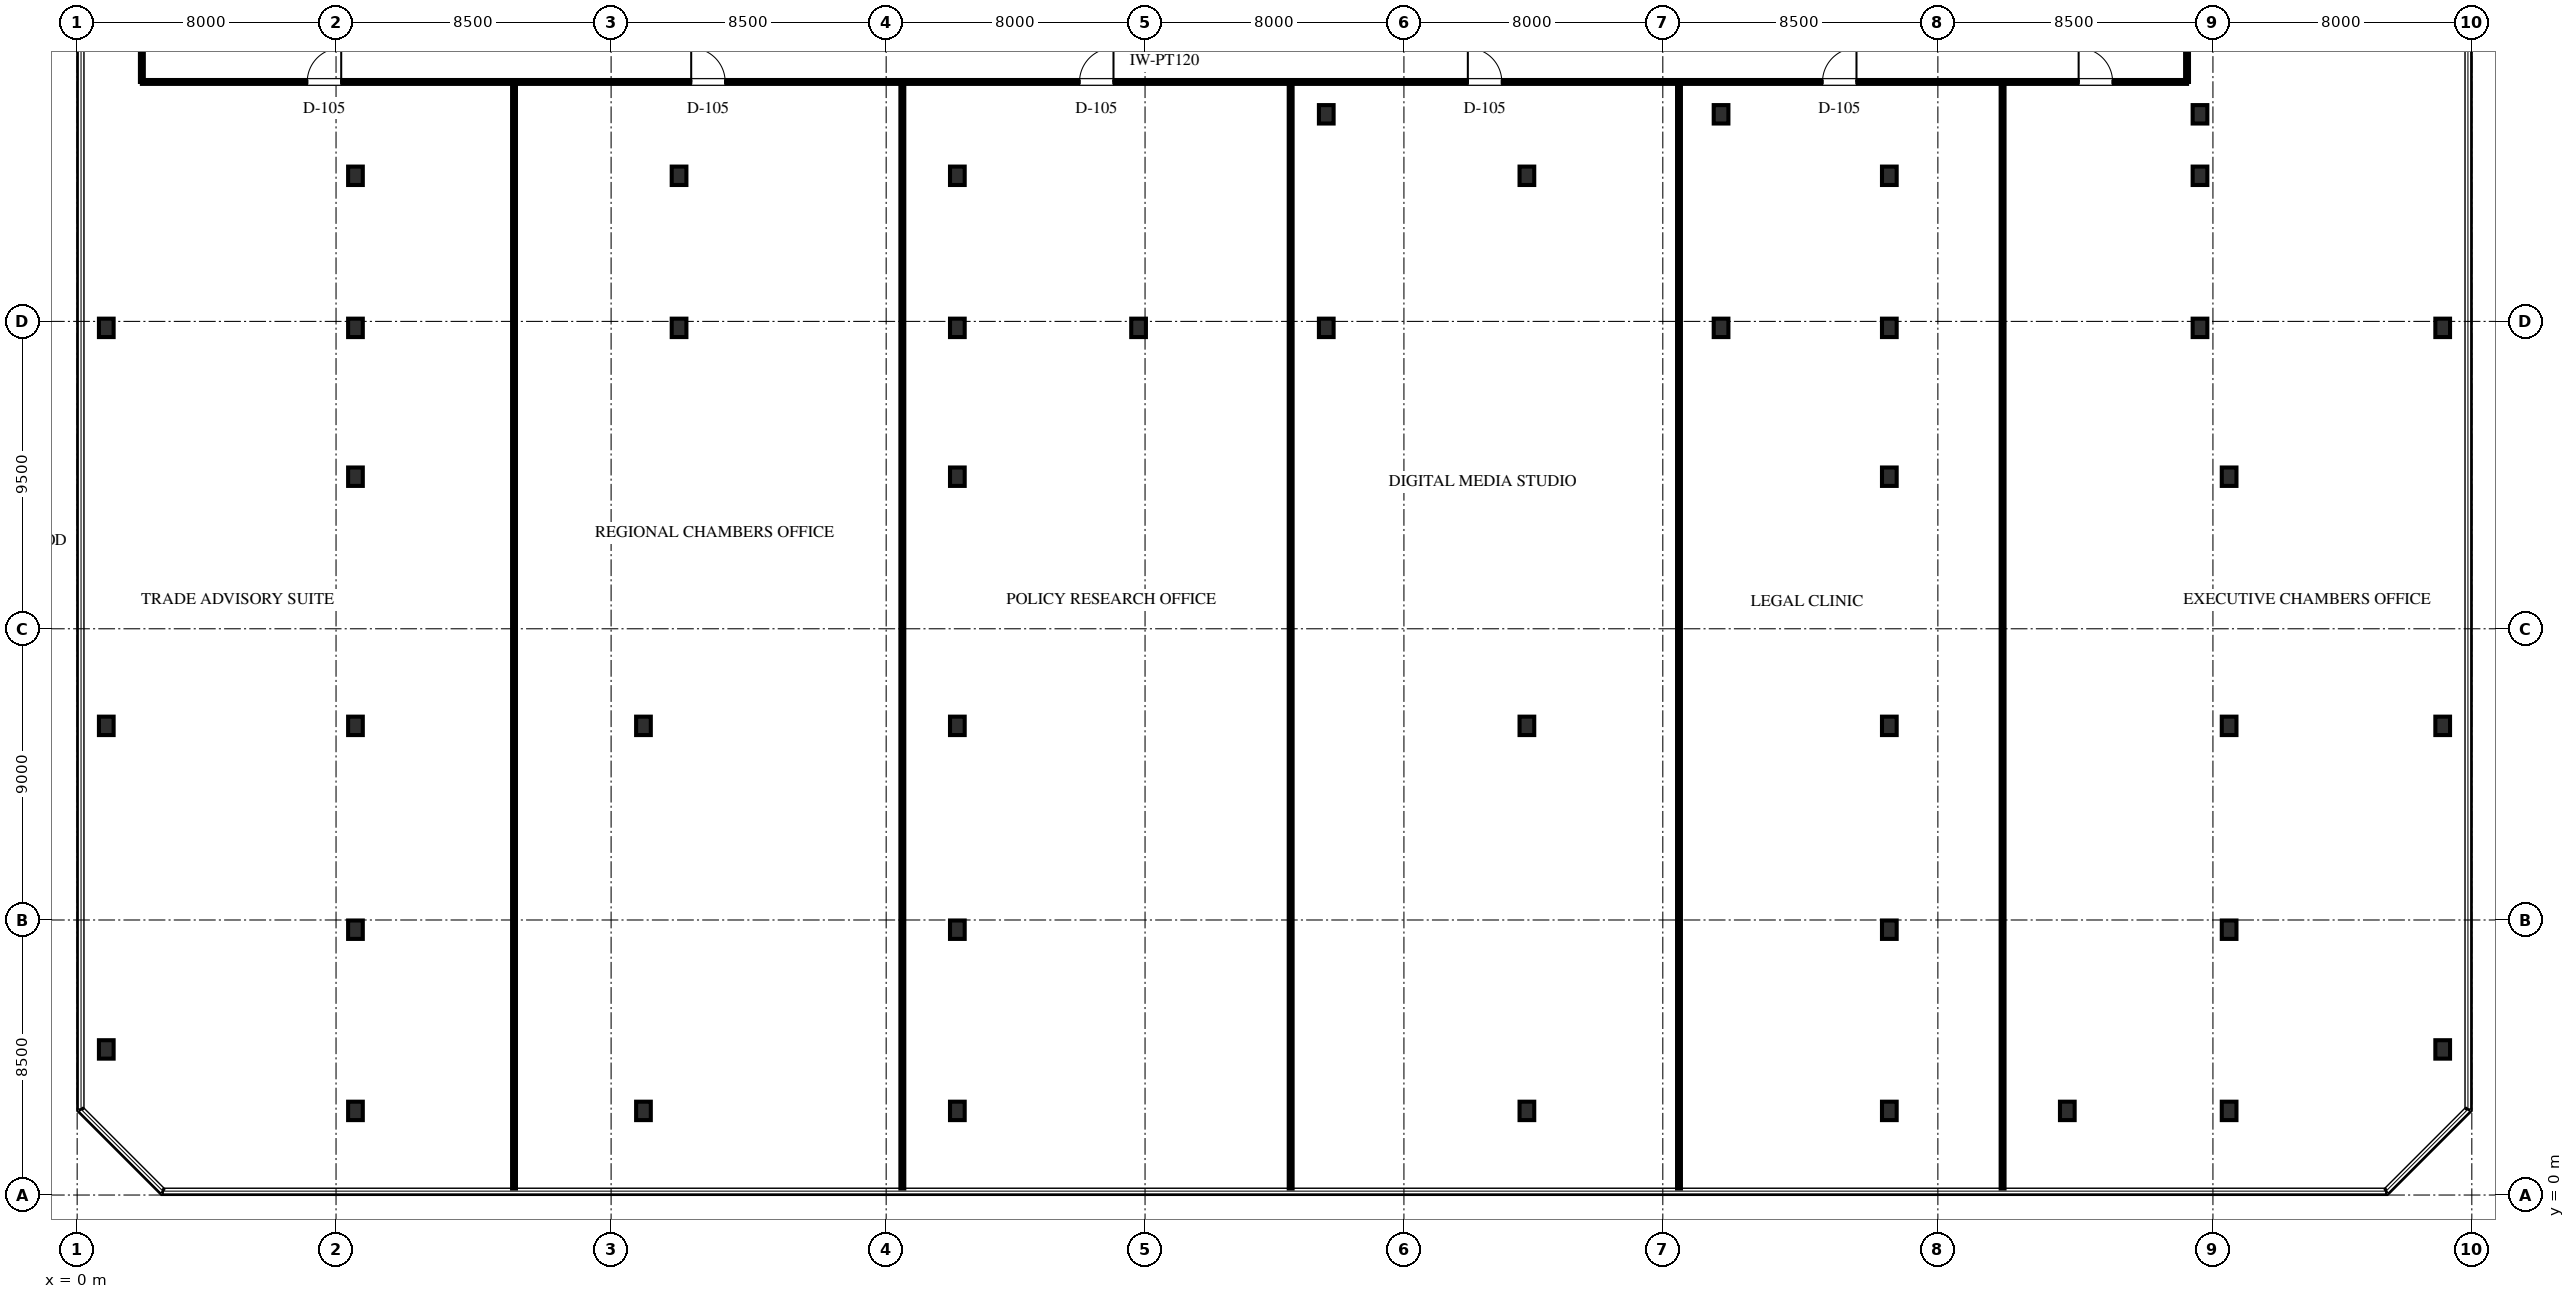
"""IFC4 building model, lengths in metres.
Left out: names, types, materials, properties, quantities, classifications, styles, units other than length and angle.
Written with IfcOpenShell. Run it as: python <this file> out.ifc"""

import sys

from ifc_helpers import new_model, si_unit, direction, frame, frame_2d, origin, origin_2d, place, context, subcontext, project, spatial, rectangle, i_section, extrude, element, fill, save


model = new_model("IFC4")
c1 = context("Model", 3, precision=1e-05, world=origin(), true_north=direction((0.0, 1.0)))
c2 = subcontext(c1, "Body", "Model", "MODEL_VIEW")
j1 = project(units=[si_unit("LENGTHUNIT", "METRE"), si_unit("PLANEANGLEUNIT", "RADIAN")], contexts=[c1])
p1 = place(None, origin())
s1 = spatial("IfcSite", under=j1, at=p1, CompositionType="ELEMENT")
p2 = place(p1, origin())
s2 = spatial("IfcBuilding", under=s1, at=p2, CompositionType="ELEMENT")
p3 = place(p2, frame((0.0, 0.0, 19.8)))
s3 = spatial("IfcBuildingStorey", under=s2, at=p3, CompositionType="ELEMENT", Elevation=19.8)
for number, where, z_axis, x_axis in (
    (1, (8.6, 2.6, 0.0), (0.0, 0.0, 1.0), (1.0, 0.0, 0.0)),
    (2, (17.5, 2.6, 0.0), (0.0, 0.0, 1.0), (1.0, 0.0, 0.0)),
    (3, (27.2, 2.6, 0.0), (0.0, 0.0, 1.0), (1.0, 0.0, 0.0)),
    (4, (44.8, 2.6, 0.0), (0.0, 0.0, 1.0), (1.0, 0.0, 0.0)),
    (5, (56.0, 2.6, 0.0), (0.0, 0.0, 1.0), (1.0, 0.0, 0.0)),
    (6, (61.5, 2.6, 0.0), (0.0, 0.0, 1.0), (1.0, 0.0, 0.0)),
    (7, (66.5, 2.6, 0.0), (0.0, 0.0, 1.0), (1.0, 0.0, 0.0)),
    (8, (8.6, 8.2, 0.0), (0.0, 0.0, 1.0), (1.0, 0.0, 0.0)),
    (9, (27.2, 8.2, 0.0), (0.0, 0.0, 1.0), (1.0, 0.0, 0.0)),
    (10, (56.0, 8.2, 0.0), (0.0, 0.0, 1.0), (1.0, 0.0, 0.0)),
    (11, (66.5, 8.2, 0.0), (0.0, 0.0, 1.0), (1.0, 0.0, 0.0)),
    (12, (8.6, 14.5, 0.0), (0.0, 0.0, 1.0), (1.0, 0.0, 0.0)),
    (13, (17.5, 14.5, 0.0), (0.0, 0.0, 1.0), (1.0, 0.0, 0.0)),
    (14, (27.2, 14.5, 0.0), (0.0, 0.0, 1.0), (1.0, 0.0, 0.0)),
    (15, (44.8, 14.5, 0.0), (0.0, 0.0, 1.0), (1.0, 0.0, 0.0)),
    (16, (56.0, 14.5, 0.0), (0.0, 0.0, 1.0), (1.0, 0.0, 0.0)),
    (17, (66.5, 14.5, 0.0), (0.0, 0.0, 1.0), (1.0, 0.0, 0.0)),
    (18, (8.6, 22.2, 0.0), (0.0, 0.0, 1.0), (1.0, 0.0, 0.0)),
    (19, (27.2, 22.2, 0.0), (0.0, 0.0, 1.0), (1.0, 0.0, 0.0)),
    (20, (56.0, 22.2, 0.0), (0.0, 0.0, 1.0), (1.0, 0.0, 0.0)),
    (21, (66.5, 22.2, 0.0), (0.0, 0.0, 1.0), (1.0, 0.0, 0.0)),
    (22, (8.6, 26.8, 0.0), (0.0, 0.0, 1.0), (1.0, 0.0, 0.0)),
    (23, (18.6, 26.8, 0.0), (0.0, 0.0, 1.0), (1.0, 0.0, 0.0)),
    (24, (27.2, 26.8, 0.0), (0.0, 0.0, 1.0), (1.0, 0.0, 0.0)),
    (25, (32.8, 26.8, 0.0), (0.0, 0.0, 1.0), (1.0, 0.0, 0.0)),
    (26, (38.6, 26.8, 0.0), (0.0, 0.0, 1.0), (1.0, 0.0, 0.0)),
    (27, (50.8, 26.8, 0.0), (0.0, 0.0, 1.0), (1.0, 0.0, 0.0)),
    (28, (56.0, 26.8, 0.0), (0.0, 0.0, 1.0), (1.0, 0.0, 0.0)),
    (29, (65.6, 26.8, 0.0), (0.0, 0.0, 1.0), (1.0, 0.0, 0.0)),
    (30, (8.6, 31.5, 0.0), (0.0, 0.0, 1.0), (1.0, 0.0, 0.0)),
    (31, (18.6, 31.5, 0.0), (0.0, 0.0, 1.0), (1.0, 0.0, 0.0)),
    (32, (27.2, 31.5, 0.0), (0.0, 0.0, 1.0), (1.0, 0.0, 0.0)),
    (33, (44.8, 31.5, 0.0), (0.0, 0.0, 1.0), (1.0, 0.0, 0.0)),
    (34, (56.0, 31.5, 0.0), (0.0, 0.0, 1.0), (1.0, 0.0, 0.0)),
    (35, (65.6, 31.5, 0.0), (0.0, 0.0, 1.0), (1.0, 0.0, 0.0)),
    (36, (0.9, 4.5, 0.0), (0.0, 0.0, 1.0), (1.0, 0.0, 0.0)),
    (37, (0.9, 14.5, 0.0), (0.0, 0.0, 1.0), (1.0, 0.0, 0.0)),
    (38, (0.9, 26.8, 0.0), (0.0, 0.0, 1.0), (1.0, 0.0, 0.0)),
    (39, (73.1, 4.5, 0.0), (0.0, 0.0, 1.0), (1.0, 0.0, 0.0)),
    (40, (73.1, 14.5, 0.0), (0.0, 0.0, 1.0), (1.0, 0.0, 0.0)),
    (41, (73.1, 26.8, 0.0), (0.0, 0.0, 1.0), (1.0, 0.0, 0.0)),
    (42, (38.6, 33.4, 0.0), (0.0, 0.0, 1.0), (1.0, 0.0, 0.0)),
    (43, (50.8, 33.4, 0.0), (0.0, 0.0, 1.0), (1.0, 0.0, 0.0)),
    (44, (65.6, 33.4, 0.0), (0.0, 0.0, 1.0), (1.0, 0.0, 0.0)),
):
    element("IfcColumn", number, at=place(p3, frame(where, z_axis=z_axis, x_axis=x_axis)), inside=s3, PredefinedType="COLUMN", context=c2, shape_type="SweptSolid", body=[
        extrude(i_section(OverallWidth=0.454, OverallDepth=0.569, WebThickness=0.078, FlangeThickness=0.125, FilletRadius=0.03, at=origin_2d()), origin(), (0.0, 0.0, 1.0), 4.5),
    ])
p4 = place(p3, frame((2.0, 34.4, 0.0), z_axis=(0.0, 0.0, 1.0), x_axis=(1.0, 0.0, 0.0)))
e45 = element("IfcWall", 45, at=p4, inside=s3, PredefinedType="PARTITIONING", context=c2, shape_type="SweptSolid", body=[
    extrude(rectangle(XDim=63.2, YDim=0.12, at=frame_2d((31.6, 0.0))), origin(), (0.0, 0.0, 1.0), 3.202),
])
p5 = place(p4, frame((5.11, 0.0, 0.0)))
e46 = element("IfcOpeningElement", 46, at=p5, cuts=e45, PredefinedType="OPENING", context=c2, shape_type="SweptSolid", body=[
    extrude(rectangle(XDim=1.05, YDim=2.2, at=frame_2d((0.525, 1.1))), frame((0.0, 0.07, 0.0), z_axis=(0.0, -1.0, 0.0), x_axis=(1.0, 0.0, 0.0)), (0.0, 0.0, 1.0), 0.14),
])
p6 = place(p4, frame((16.975, 0.0, 0.0)))
e47 = element("IfcOpeningElement", 47, at=p6, cuts=e45, PredefinedType="OPENING", context=c2, shape_type="SweptSolid", body=[
    extrude(rectangle(XDim=1.05, YDim=2.2, at=frame_2d((0.525, 1.1))), frame((0.0, 0.07, 0.0), z_axis=(0.0, -1.0, 0.0), x_axis=(1.0, 0.0, 0.0)), (0.0, 0.0, 1.0), 0.14),
])
p7 = place(p4, frame((28.975, 0.0, 0.0)))
e48 = element("IfcOpeningElement", 48, at=p7, cuts=e45, PredefinedType="OPENING", context=c2, shape_type="SweptSolid", body=[
    extrude(rectangle(XDim=1.05, YDim=2.2, at=frame_2d((0.525, 1.1))), frame((0.0, 0.07, 0.0), z_axis=(0.0, -1.0, 0.0), x_axis=(1.0, 0.0, 0.0)), (0.0, 0.0, 1.0), 0.14),
])
p8 = place(p4, frame((40.975, 0.0, 0.0)))
e49 = element("IfcOpeningElement", 49, at=p8, cuts=e45, PredefinedType="OPENING", context=c2, shape_type="SweptSolid", body=[
    extrude(rectangle(XDim=1.05, YDim=2.2, at=frame_2d((0.525, 1.1))), frame((0.0, 0.07, 0.0), z_axis=(0.0, -1.0, 0.0), x_axis=(1.0, 0.0, 0.0)), (0.0, 0.0, 1.0), 0.14),
])
p9 = place(p4, frame((51.935, 0.0, 0.0)))
e50 = element("IfcOpeningElement", 50, at=p9, cuts=e45, PredefinedType="OPENING", context=c2, shape_type="SweptSolid", body=[
    extrude(rectangle(XDim=1.05, YDim=2.2, at=frame_2d((0.525, 1.1))), frame((0.0, 0.07, 0.0), z_axis=(0.0, -1.0, 0.0), x_axis=(1.0, 0.0, 0.0)), (0.0, 0.0, 1.0), 0.14),
])
p10 = place(p4, frame((59.85, 0.0, 0.0)))
e51 = element("IfcOpeningElement", 51, at=p10, cuts=e45, PredefinedType="OPENING", context=c2, shape_type="SweptSolid", body=[
    extrude(rectangle(XDim=1.05, YDim=2.2, at=frame_2d((0.525, 1.1))), frame((0.0, 0.07, 0.0), z_axis=(0.0, -1.0, 0.0), x_axis=(1.0, 0.0, 0.0)), (0.0, 0.0, 1.0), 0.14),
])
p11 = place(p3, frame((2.0, 34.4, 0.0), z_axis=(0.0, 0.0, 1.0), x_axis=(0.0, 1.0, 0.0)))
e52 = element("IfcWall", 52, at=p11, inside=s3, PredefinedType="PARTITIONING", context=c2, shape_type="SweptSolid", body=[
    extrude(rectangle(XDim=3.65, YDim=0.12, at=frame_2d((1.825, 0.0))), origin(), (0.0, 0.0, 1.0), 3.202),
])
p12 = place(p3, frame((65.2, 34.4, 0.0), z_axis=(0.0, 0.0, 1.0), x_axis=(0.0, 1.0, 0.0)))
e53 = element("IfcWall", 53, at=p12, inside=s3, PredefinedType="PARTITIONING", context=c2, shape_type="SweptSolid", body=[
    extrude(rectangle(XDim=3.167, YDim=0.12, at=frame_2d((1.583, 0.0))), origin(), (0.0, 0.0, 1.0), 3.202),
])
for number, where, z_axis, x_axis in (
    (54, (13.5, 0.2, 0.0), (0.0, 0.0, 1.0), (0.0, 1.0, 0.0)),
    (55, (25.5, 0.2, 0.0), (0.0, 0.0, 1.0), (0.0, 1.0, 0.0)),
    (56, (37.5, 0.2, 0.0), (0.0, 0.0, 1.0), (0.0, 1.0, 0.0)),
    (57, (49.5, 0.2, 0.0), (0.0, 0.0, 1.0), (0.0, 1.0, 0.0)),
    (58, (59.5, 0.2, 0.0), (0.0, 0.0, 1.0), (0.0, 1.0, 0.0)),
):
    element("IfcWall", number, at=place(p3, frame(where, z_axis=z_axis, x_axis=x_axis)), inside=s3, PredefinedType="PARTITIONING", context=c2, shape_type="SweptSolid", body=[
        extrude(rectangle(XDim=34.132, YDim=0.12, at=frame_2d((17.066, 0.0))), origin(), (0.0, 0.0, 1.0), 3.202),
    ])
p13 = place(p5, origin())
e59 = element("IfcDoor", 59, at=p13, inside=s3, OperationType="SINGLE_SWING_RIGHT", PredefinedType="DOOR", context=c2, shape_type="SweptSolid", body=[
    extrude(rectangle(XDim=1.05, YDim=2.2, at=frame_2d((0.525, 1.1))), frame((0.0, 0.025, 0.0), z_axis=(0.0, -1.0, 0.0), x_axis=(1.0, 0.0, 0.0)), (0.0, 0.0, 1.0), 0.05),
])
fill(e46, e59)
p14 = place(p6, origin())
e60 = element("IfcDoor", 60, at=p14, inside=s3, OperationType="SINGLE_SWING_LEFT", PredefinedType="DOOR", context=c2, shape_type="SweptSolid", body=[
    extrude(rectangle(XDim=1.05, YDim=2.2, at=frame_2d((0.525, 1.1))), frame((0.0, 0.025, 0.0), z_axis=(0.0, -1.0, 0.0), x_axis=(1.0, 0.0, 0.0)), (0.0, 0.0, 1.0), 0.05),
])
fill(e47, e60)
p15 = place(p7, origin())
e61 = element("IfcDoor", 61, at=p15, inside=s3, OperationType="SINGLE_SWING_RIGHT", PredefinedType="DOOR", context=c2, shape_type="SweptSolid", body=[
    extrude(rectangle(XDim=1.05, YDim=2.2, at=frame_2d((0.525, 1.1))), frame((0.0, 0.025, 0.0), z_axis=(0.0, -1.0, 0.0), x_axis=(1.0, 0.0, 0.0)), (0.0, 0.0, 1.0), 0.05),
])
fill(e48, e61)
p16 = place(p8, origin())
e62 = element("IfcDoor", 62, at=p16, inside=s3, OperationType="SINGLE_SWING_LEFT", PredefinedType="DOOR", context=c2, shape_type="SweptSolid", body=[
    extrude(rectangle(XDim=1.05, YDim=2.2, at=frame_2d((0.525, 1.1))), frame((0.0, 0.025, 0.0), z_axis=(0.0, -1.0, 0.0), x_axis=(1.0, 0.0, 0.0)), (0.0, 0.0, 1.0), 0.05),
])
fill(e49, e62)
p17 = place(p9, origin())
e63 = element("IfcDoor", 63, at=p17, inside=s3, OperationType="SINGLE_SWING_RIGHT", PredefinedType="DOOR", context=c2, shape_type="SweptSolid", body=[
    extrude(rectangle(XDim=1.05, YDim=2.2, at=frame_2d((0.525, 1.1))), frame((0.0, 0.025, 0.0), z_axis=(0.0, -1.0, 0.0), x_axis=(1.0, 0.0, 0.0)), (0.0, 0.0, 1.0), 0.05),
])
fill(e50, e63)
p18 = place(p10, origin())
e64 = element("IfcDoor", 64, at=p18, inside=s3, OperationType="SINGLE_SWING_LEFT", PredefinedType="DOOR", context=c2, shape_type="SweptSolid", body=[
    extrude(rectangle(XDim=1.05, YDim=2.2, at=frame_2d((0.525, 1.1))), frame((0.0, 0.025, 0.0), z_axis=(0.0, -1.0, 0.0), x_axis=(1.0, 0.0, 0.0)), (0.0, 0.0, 1.0), 0.05),
])
fill(e51, e64)
save(model, sys.argv[1])
